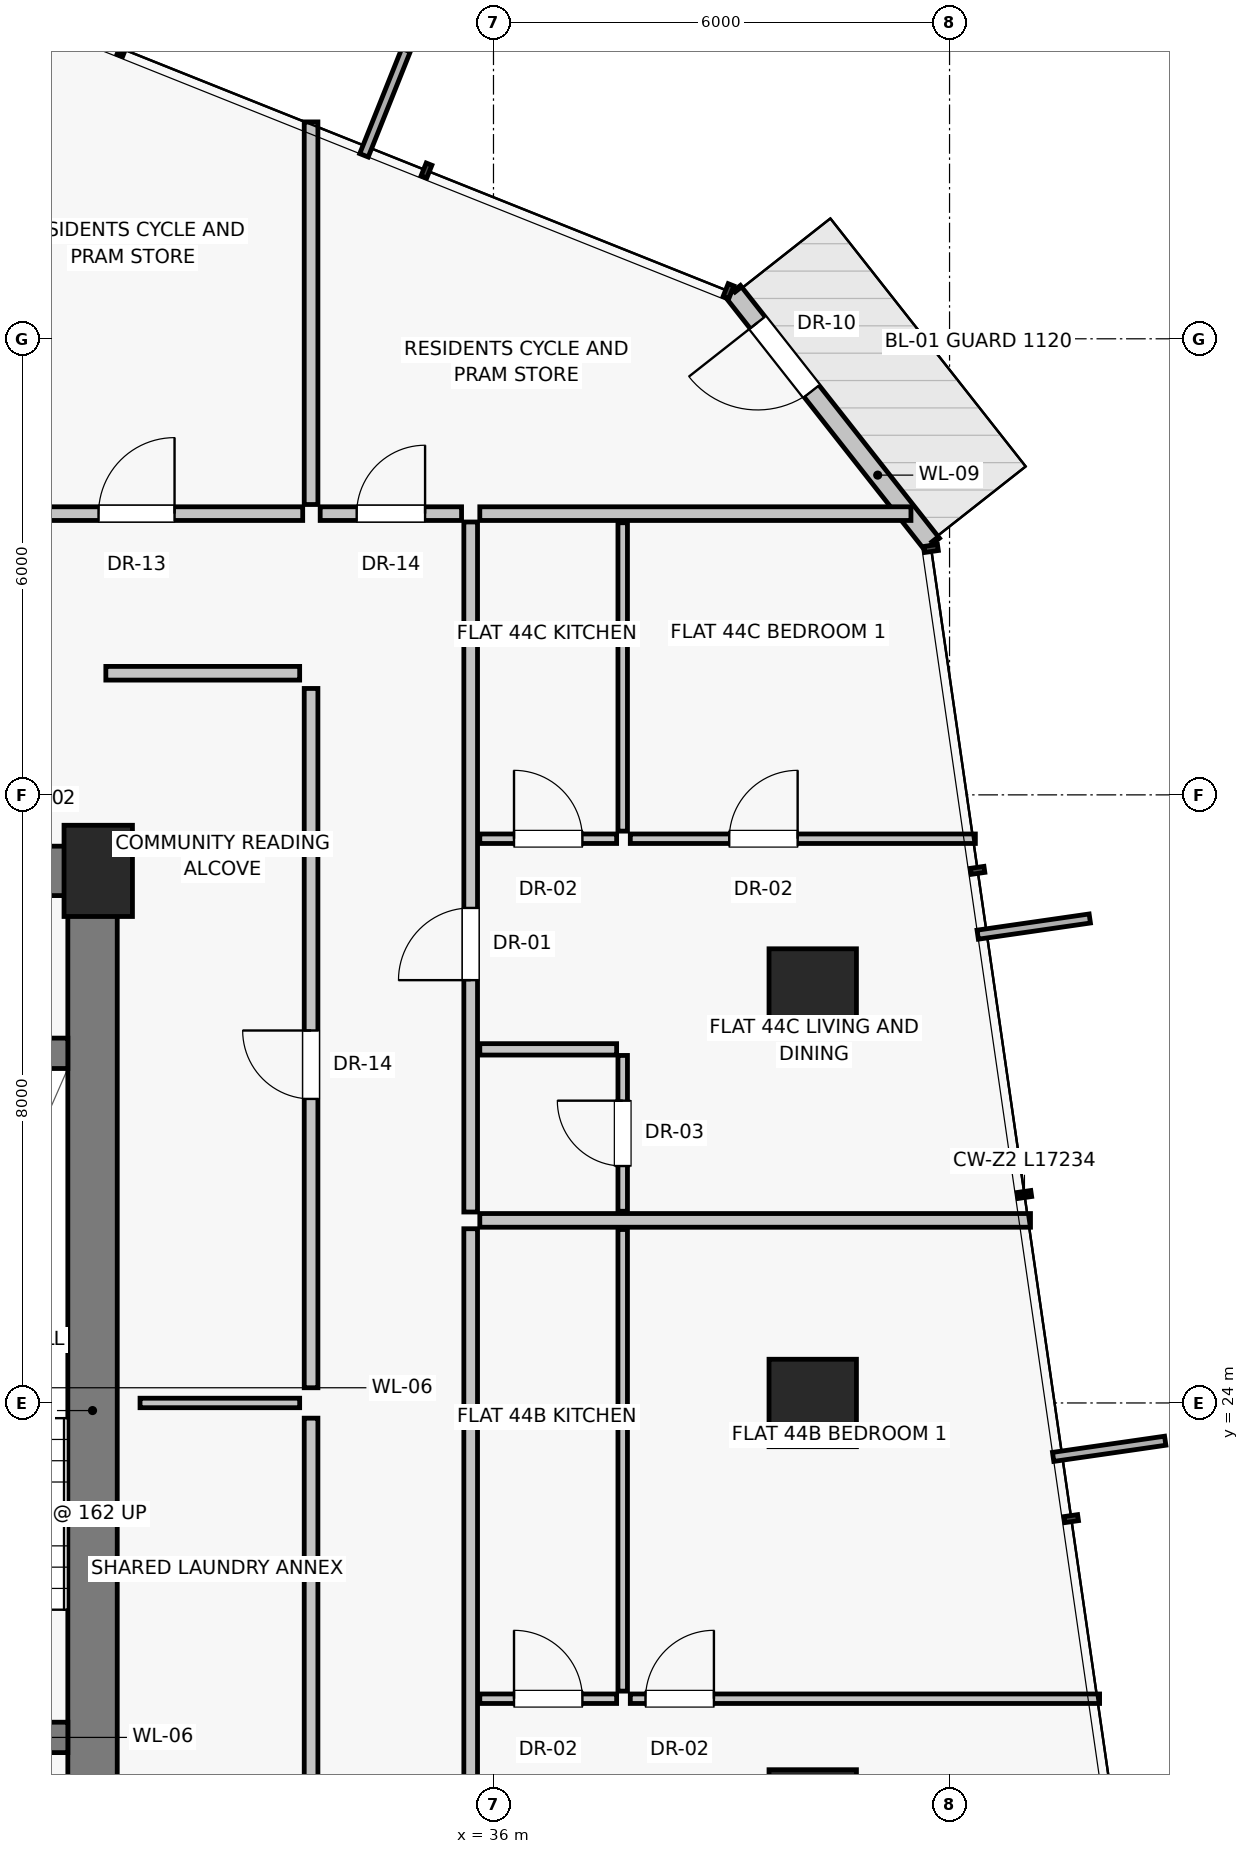
"""IFC4 building model, lengths in metres.
Left out: names, types, materials, properties, quantities, classifications, styles, units other than length and angle.
Written with IfcOpenShell. Run it as: python <this file> out.ifc"""

import sys

from ifc_helpers import new_model, si_unit, direction, frame, frame_2d, origin, origin_2d, place, context, subcontext, project, spatial, rectangle, extrude, source, transform, mapped, element, fill, save


model = new_model("IFC4")
c1 = context("Model", 3, precision=1e-05, world=origin(), true_north=direction((0.0, 1.0)))
c2 = subcontext(c1, "Body", "Model", "MODEL_VIEW")
j1 = project(units=[si_unit("LENGTHUNIT", "METRE"), si_unit("PLANEANGLEUNIT", "RADIAN")], contexts=[c1])
p1 = place(None, origin())
s1 = spatial("IfcSite", under=j1, at=p1, CompositionType="ELEMENT")
p2 = place(p1, origin())
s2 = spatial("IfcBuilding", under=s1, at=p2, CompositionType="ELEMENT")
p3 = place(p2, frame((0.0, 0.0, 155.5)))
s3 = spatial("IfcBuildingStorey", under=s2, at=p3, CompositionType="ELEMENT", Elevation=155.5)
p4 = place(p3, frame((30.8, 31.0, 0.0), z_axis=(0.0, 0.0, 1.0), x_axis=(1.0, 0.0, 0.0)))
e1 = element("IfcColumn", 1, at=p4, inside=s3, PredefinedType="PILASTER", context=c2, shape_type="SweptSolid", body=[
    extrude(rectangle(XDim=0.9, YDim=1.2, at=origin_2d()), origin(), (0.0, 0.0, 1.0), 3.25),
])
for number, where, z_axis, x_axis in (
    (2, (40.2, 18.6, 0.0), (0.0, 0.0, 1.0), (1.0, 0.0, 0.0)),
    (3, (40.2, 24.0, 0.0), (0.0, 0.0, 1.0), (1.0, 0.0, 0.0)),
    (4, (40.2, 29.4, 0.0), (0.0, 0.0, 1.0), (1.0, 0.0, 0.0)),
):
    element("IfcColumn", number, at=place(p3, frame(where, z_axis=z_axis, x_axis=x_axis)), inside=s3, PredefinedType="COLUMN", context=c2, shape_type="SweptSolid", body=[
        extrude(rectangle(XDim=1.15, YDim=1.15, at=origin_2d()), origin(), (0.0, 0.0, 1.0), 3.25),
    ])
p5 = place(p3, frame((41.77, 35.299, 0.0), z_axis=(0.0, 0.0, 1.0), x_axis=(-0.618677028306, 0.785645425523, 0.0)))
e5 = element("IfcWall", 5, at=p5, inside=s3, PredefinedType="SOLIDWALL", context=c2, shape_type="SweptSolid", body=[
    extrude(rectangle(XDim=4.233, YDim=0.25, at=frame_2d((2.117, 0.0))), origin(), (0.0, 0.0, 1.0), 2.97),
])
p6 = place(p5, frame((2.56, 0.0, 0.0)))
e6 = element("IfcOpeningElement", 6, at=p6, cuts=e5, PredefinedType="OPENING", context=c2, shape_type="SweptSolid", body=[
    extrude(rectangle(XDim=1.15, YDim=2.25, at=frame_2d((0.575, 1.125))), frame((0.0, 0.135, 0.0), z_axis=(0.0, -1.0, 0.0), x_axis=(1.0, 0.0, 0.0)), (0.0, 0.0, 1.0), 0.27),
])
p7 = place(p3, frame((30.725, 16.8, 0.0), z_axis=(0.0, 0.0, 1.0), x_axis=(0.0, 1.0, 0.0)))
e7 = element("IfcWall", 7, at=p7, inside=s3, PredefinedType="SHEAR", context=c2, shape_type="SweptSolid", body=[
    extrude(rectangle(XDim=14.2, YDim=0.65, at=frame_2d((7.1, 0.0))), origin(), (0.0, 0.0, 1.0), 2.97),
])
p8 = place(p3, frame((27.0, 31.0, 0.0), z_axis=(0.0, 0.0, 1.0), x_axis=(1.0, 0.0, 0.0)))
e8 = element("IfcWall", 8, at=p8, inside=s3, PredefinedType="SHEAR", context=c2, shape_type="SweptSolid", body=[
    extrude(rectangle(XDim=3.8, YDim=0.65, at=frame_2d((1.9, 0.0))), origin(), (0.0, 0.0, 1.0), 2.97),
])
p9 = place(p8, frame((1.15, 0.0, 0.0)))
e9 = element("IfcOpeningElement", 9, at=p9, cuts=e8, PredefinedType="OPENING", context=c2, shape_type="SweptSolid", body=[
    extrude(rectangle(XDim=1.0, YDim=2.01, at=frame_2d((0.5, 1.005))), frame((0.0, 0.335, 0.0), z_axis=(0.0, -1.0, 0.0), x_axis=(1.0, 0.0, 0.0)), (0.0, 0.0, 1.0), 0.67),
])
p10 = place(p3, frame((27.0, 19.6, 0.0), z_axis=(0.0, 0.0, 1.0), x_axis=(1.0, 0.0, 0.0)))
e10 = element("IfcWall", 10, at=p10, inside=s3, PredefinedType="SHEAR", context=c2, shape_type="SweptSolid", body=[
    extrude(rectangle(XDim=3.4, YDim=0.4, at=frame_2d((1.7, 0.0))), origin(), (0.0, 0.0, 1.0), 2.97),
])
p11 = place(p10, frame((1.05, 0.0, 0.0)))
e11 = element("IfcOpeningElement", 11, at=p11, cuts=e10, PredefinedType="OPENING", context=c2, shape_type="SweptSolid", body=[
    extrude(rectangle(XDim=1.1, YDim=2.03, at=frame_2d((0.55, 1.015))), frame((0.0, 0.21, 0.0), z_axis=(0.0, -1.0, 0.0), x_axis=(1.0, 0.0, 0.0)), (0.0, 0.0, 1.0), 0.42),
])
p12 = place(p3, frame((27.0, 28.6, 0.0), z_axis=(0.0, 0.0, 1.0), x_axis=(1.0, 0.0, 0.0)))
e12 = element("IfcWall", 12, at=p12, inside=s3, PredefinedType="SHEAR", context=c2, shape_type="SweptSolid", body=[
    extrude(rectangle(XDim=3.4, YDim=0.4, at=frame_2d((1.7, 0.0))), origin(), (0.0, 0.0, 1.0), 2.97),
])
p13 = place(p3, frame((33.6, 14.4, 0.0), z_axis=(0.0, 0.0, 1.0), x_axis=(0.0, 1.0, 0.0)))
e13 = element("IfcWall", 13, at=p13, inside=s3, PredefinedType="PARTITIONING", context=c2, shape_type="SweptSolid", body=[
    extrude(rectangle(XDim=9.4, YDim=0.18, at=frame_2d((4.7, 0.0))), origin(), (0.0, 0.0, 1.0), 2.97),
])
p14 = place(p13, frame((3.8, 0.0, 0.0)))
e14 = element("IfcOpeningElement", 14, at=p14, cuts=e13, PredefinedType="OPENING", context=c2, shape_type="SweptSolid", body=[
    extrude(rectangle(XDim=0.9, YDim=2.01, at=frame_2d((0.45, 1.005))), frame((0.0, 0.1, 0.0), z_axis=(0.0, -1.0, 0.0), x_axis=(1.0, 0.0, 0.0)), (0.0, 0.0, 1.0), 0.2),
])
p15 = place(p3, frame((33.6, 24.2, 0.0), z_axis=(0.0, 0.0, 1.0), x_axis=(0.0, 1.0, 0.0)))
e15 = element("IfcWall", 15, at=p15, inside=s3, PredefinedType="PARTITIONING", context=c2, shape_type="SweptSolid", body=[
    extrude(rectangle(XDim=9.2, YDim=0.18, at=frame_2d((4.6, 0.0))), origin(), (0.0, 0.0, 1.0), 2.97),
])
p16 = place(p15, frame((3.8, 0.0, 0.0)))
e16 = element("IfcOpeningElement", 16, at=p16, cuts=e15, PredefinedType="OPENING", context=c2, shape_type="SweptSolid", body=[
    extrude(rectangle(XDim=0.9, YDim=2.01, at=frame_2d((0.45, 1.005))), frame((0.0, 0.1, 0.0), z_axis=(0.0, -1.0, 0.0), x_axis=(1.0, 0.0, 0.0)), (0.0, 0.0, 1.0), 0.2),
])
p17 = place(p3, frame((31.35, 24.0, 0.0), z_axis=(0.0, 0.0, 1.0), x_axis=(1.0, 0.0, 0.0)))
e17 = element("IfcWall", 17, at=p17, inside=s3, PredefinedType="PARTITIONING", context=c2, shape_type="SweptSolid", body=[
    extrude(rectangle(XDim=2.1, YDim=0.125, at=frame_2d((1.05, 0.0))), origin(), (0.0, 0.0, 1.0), 2.97),
])
p18 = place(p3, frame((30.9, 33.6, 0.0), z_axis=(0.0, 0.0, 1.0), x_axis=(1.0, 0.0, 0.0)))
e18 = element("IfcWall", 18, at=p18, inside=s3, PredefinedType="PARTITIONING", context=c2, shape_type="SweptSolid", body=[
    extrude(rectangle(XDim=2.55, YDim=0.18, at=frame_2d((1.275, 0.0))), origin(), (0.0, 0.0, 1.0), 2.97),
])
p19 = place(p3, frame((33.6, 35.82, 0.0), z_axis=(0.0, 0.0, 1.0), x_axis=(0.0, 1.0, 0.0)))
e19 = element("IfcWall", 19, at=p19, inside=s3, PredefinedType="PARTITIONING", context=c2, shape_type="SweptSolid", body=[
    extrude(rectangle(XDim=5.033, YDim=0.18, at=frame_2d((2.517, 0.0))), origin(), (0.0, 0.0, 1.0), 2.97),
])
p20 = place(p3, frame((29.118, 35.7, 0.0), z_axis=(0.0, 0.0, 1.0), x_axis=(1.0, 0.0, 0.0)))
e20 = element("IfcWall", 20, at=p20, inside=s3, PredefinedType="PARTITIONING", context=c2, shape_type="SweptSolid", body=[
    extrude(rectangle(XDim=4.372, YDim=0.18, at=frame_2d((2.186, 0.0))), origin(), (0.0, 0.0, 1.0), 2.55),
])
p21 = place(p20, frame((1.686, 0.0, 0.0)))
e21 = element("IfcOpeningElement", 21, at=p21, cuts=e20, PredefinedType="OPENING", context=c2, shape_type="SweptSolid", body=[
    extrude(rectangle(XDim=1.0, YDim=2.01, at=frame_2d((0.5, 1.005))), frame((0.0, 0.1, 0.0), z_axis=(0.0, -1.0, 0.0), x_axis=(1.0, 0.0, 0.0)), (0.0, 0.0, 1.0), 0.2),
])
p22 = place(p3, frame((35.82, 35.7, 0.0), z_axis=(0.0, 0.0, 1.0), x_axis=(1.0, 0.0, 0.0)))
e22 = element("IfcWall", 22, at=p22, inside=s3, PredefinedType="PARTITIONING", context=c2, shape_type="SweptSolid", body=[
    extrude(rectangle(XDim=5.672, YDim=0.18, at=frame_2d((2.836, 0.0))), origin(), (0.0, 0.0, 1.0), 2.97),
])
p23 = place(p3, frame((35.7, 12.21, 0.0), z_axis=(0.0, 0.0, 1.0), x_axis=(0.0, 1.0, 0.0)))
e23 = element("IfcWall", 23, at=p23, inside=s3, PredefinedType="PARTITIONING", context=c2, shape_type="SweptSolid", body=[
    extrude(rectangle(XDim=14.082, YDim=0.18, at=frame_2d((7.041, 0.0))), origin(), (0.0, 0.0, 1.0), 2.55),
])
p24 = place(p23, frame((4.544, 0.0, 0.0)))
e24 = element("IfcOpeningElement", 24, at=p24, cuts=e23, PredefinedType="OPENING", context=c2, shape_type="SweptSolid", body=[
    extrude(rectangle(XDim=0.95, YDim=2.02, at=frame_2d((0.475, 1.01))), frame((0.0, 0.1, 0.0), z_axis=(0.0, -1.0, 0.0), x_axis=(1.0, 0.0, 0.0)), (0.0, 0.0, 1.0), 0.2),
])
p25 = place(p3, frame((35.82, 20.109, 0.0), z_axis=(0.0, 0.0, 1.0), x_axis=(1.0, 0.0, 0.0)))
e25 = element("IfcWall", 25, at=p25, inside=s3, PredefinedType="PARTITIONING", context=c2, shape_type="SweptSolid", body=[
    extrude(rectangle(XDim=1.8, YDim=0.125, at=frame_2d((0.9, 0.0))), origin(), (0.0, 0.0, 1.0), 2.97),
])
p26 = place(p25, frame((0.45, 0.0, 0.0)))
e26 = element("IfcOpeningElement", 26, at=p26, cuts=e25, PredefinedType="OPENING", context=c2, shape_type="SweptSolid", body=[
    extrude(rectangle(XDim=0.9, YDim=2.01, at=frame_2d((0.45, 1.005))), frame((0.0, 0.073, 0.0), z_axis=(0.0, -1.0, 0.0), x_axis=(1.0, 0.0, 0.0)), (0.0, 0.0, 1.0), 0.145),
])
p27 = place(p3, frame((37.7, 20.209, 0.0), z_axis=(0.0, 0.0, 1.0), x_axis=(0.0, 1.0, 0.0)))
e27 = element("IfcWall", 27, at=p27, inside=s3, PredefinedType="PARTITIONING", context=c2, shape_type="SweptSolid", body=[
    extrude(rectangle(XDim=6.073, YDim=0.125, at=frame_2d((3.037, 0.0))), origin(), (0.0, 0.0, 1.0), 2.97),
])
p28 = place(p3, frame((37.8, 20.109, 0.0), z_axis=(0.0, 0.0, 1.0), x_axis=(1.0, 0.0, 0.0)))
e28 = element("IfcWall", 28, at=p28, inside=s3, PredefinedType="PARTITIONING", context=c2, shape_type="SweptSolid", body=[
    extrude(rectangle(XDim=6.174, YDim=0.125, at=frame_2d((3.087, 0.0))), origin(), (0.0, 0.0, 1.0), 2.97),
])
p29 = place(p28, frame((0.2, 0.0, 0.0)))
e29 = element("IfcOpeningElement", 29, at=p29, cuts=e28, PredefinedType="OPENING", context=c2, shape_type="SweptSolid", body=[
    extrude(rectangle(XDim=0.9, YDim=2.01, at=frame_2d((0.45, 1.005))), frame((0.0, 0.073, 0.0), z_axis=(0.0, -1.0, 0.0), x_axis=(1.0, 0.0, 0.0)), (0.0, 0.0, 1.0), 0.145),
])
p30 = place(p3, frame((35.82, 26.402, 0.0), z_axis=(0.0, 0.0, 1.0), x_axis=(1.0, 0.0, 0.0)))
e30 = element("IfcWall", 30, at=p30, inside=s3, PredefinedType="PARTITIONING", context=c2, shape_type="SweptSolid", body=[
    extrude(rectangle(XDim=7.245, YDim=0.18, at=frame_2d((3.623, 0.0))), origin(), (0.0, 0.0, 1.0), 2.97),
])
p31 = place(p3, frame((35.7, 26.512, 0.0), z_axis=(0.0, 0.0, 1.0), x_axis=(0.0, 1.0, 0.0)))
e31 = element("IfcWall", 31, at=p31, inside=s3, PredefinedType="PARTITIONING", context=c2, shape_type="SweptSolid", body=[
    extrude(rectangle(XDim=9.078, YDim=0.18, at=frame_2d((4.539, 0.0))), origin(), (0.0, 0.0, 1.0), 2.55),
])
p32 = place(p31, frame((3.051, 0.0, 0.0)))
e32 = element("IfcOpeningElement", 32, at=p32, cuts=e31, PredefinedType="OPENING", context=c2, shape_type="SweptSolid", body=[
    extrude(rectangle(XDim=0.95, YDim=2.02, at=frame_2d((0.475, 1.01))), frame((0.0, 0.1, 0.0), z_axis=(0.0, -1.0, 0.0), x_axis=(1.0, 0.0, 0.0)), (0.0, 0.0, 1.0), 0.2),
])
p33 = place(p3, frame((35.82, 28.652, 0.0), z_axis=(0.0, 0.0, 1.0), x_axis=(1.0, 0.0, 0.0)))
e33 = element("IfcWall", 33, at=p33, inside=s3, PredefinedType="PARTITIONING", context=c2, shape_type="SweptSolid", body=[
    extrude(rectangle(XDim=1.8, YDim=0.15, at=frame_2d((0.9, 0.0))), origin(), (0.0, 0.0, 1.0), 2.97),
])
p34 = place(p3, frame((37.7, 26.522, 0.0), z_axis=(0.0, 0.0, 1.0), x_axis=(0.0, 1.0, 0.0)))
e34 = element("IfcWall", 34, at=p34, inside=s3, PredefinedType="PARTITIONING", context=c2, shape_type="SweptSolid", body=[
    extrude(rectangle(XDim=2.05, YDim=0.125, at=frame_2d((1.025, 0.0))), origin(), (0.0, 0.0, 1.0), 2.97),
])
p35 = place(p34, frame((0.595, 0.0, 0.0)))
e35 = element("IfcOpeningElement", 35, at=p35, cuts=e34, PredefinedType="OPENING", context=c2, shape_type="SweptSolid", body=[
    extrude(rectangle(XDim=0.86, YDim=2.01, at=frame_2d((0.43, 1.005))), frame((0.0, 0.073, 0.0), z_axis=(0.0, -1.0, 0.0), x_axis=(1.0, 0.0, 0.0)), (0.0, 0.0, 1.0), 0.145),
])
p36 = place(p3, frame((35.82, 31.423, 0.0), z_axis=(0.0, 0.0, 1.0), x_axis=(1.0, 0.0, 0.0)))
e36 = element("IfcWall", 36, at=p36, inside=s3, PredefinedType="PARTITIONING", context=c2, shape_type="SweptSolid", body=[
    extrude(rectangle(XDim=1.8, YDim=0.125, at=frame_2d((0.9, 0.0))), origin(), (0.0, 0.0, 1.0), 2.97),
])
p37 = place(p36, frame((0.45, 0.0, 0.0)))
e37 = element("IfcOpeningElement", 37, at=p37, cuts=e36, PredefinedType="OPENING", context=c2, shape_type="SweptSolid", body=[
    extrude(rectangle(XDim=0.9, YDim=2.01, at=frame_2d((0.45, 1.005))), frame((0.0, 0.073, 0.0), z_axis=(0.0, -1.0, 0.0), x_axis=(1.0, 0.0, 0.0)), (0.0, 0.0, 1.0), 0.145),
])
p38 = place(p3, frame((37.7, 31.523, 0.0), z_axis=(0.0, 0.0, 1.0), x_axis=(0.0, 1.0, 0.0)))
e38 = element("IfcWall", 38, at=p38, inside=s3, PredefinedType="PARTITIONING", context=c2, shape_type="SweptSolid", body=[
    extrude(rectangle(XDim=4.057, YDim=0.125, at=frame_2d((2.029, 0.0))), origin(), (0.0, 0.0, 1.0), 2.97),
])
p39 = place(p3, frame((37.8, 31.423, 0.0), z_axis=(0.0, 0.0, 1.0), x_axis=(1.0, 0.0, 0.0)))
e39 = element("IfcWall", 39, at=p39, inside=s3, PredefinedType="PARTITIONING", context=c2, shape_type="SweptSolid", body=[
    extrude(rectangle(XDim=4.54, YDim=0.125, at=frame_2d((2.27, 0.0))), origin(), (0.0, 0.0, 1.0), 2.97),
])
p40 = place(p39, frame((1.302, 0.0, 0.0)))
e40 = element("IfcOpeningElement", 40, at=p40, cuts=e39, PredefinedType="OPENING", context=c2, shape_type="SweptSolid", body=[
    extrude(rectangle(XDim=0.9, YDim=2.01, at=frame_2d((0.45, 1.005))), frame((0.0, 0.073, 0.0), z_axis=(0.0, -1.0, 0.0), x_axis=(1.0, 0.0, 0.0)), (0.0, 0.0, 1.0), 0.145),
])
p41 = place(p3, frame((33.72, 35.7, 0.0), z_axis=(0.0, 0.0, 1.0), x_axis=(1.0, 0.0, 0.0)))
e41 = element("IfcWall", 41, at=p41, inside=s3, PredefinedType="PARTITIONING", context=c2, shape_type="SweptSolid", body=[
    extrude(rectangle(XDim=1.86, YDim=0.18, at=frame_2d((0.93, 0.0))), origin(), (0.0, 0.0, 1.0), 2.97),
])
p42 = place(p41, frame((0.48, 0.0, 0.0)))
e42 = element("IfcOpeningElement", 42, at=p42, cuts=e41, PredefinedType="OPENING", context=c2, shape_type="SweptSolid", body=[
    extrude(rectangle(XDim=0.9, YDim=2.01, at=frame_2d((0.45, 1.005))), frame((0.0, 0.1, 0.0), z_axis=(0.0, -1.0, 0.0), x_axis=(1.0, 0.0, 0.0)), (0.0, 0.0, 1.0), 0.2),
])
m1 = source(origin(), c2, "Body", "SweptSolid", [
    extrude(rectangle(XDim=1.15, YDim=2.25, at=frame_2d((0.575, 1.125))), frame((0.0, 0.025, 0.0), z_axis=(0.0, -1.0, 0.0), x_axis=(1.0, 0.0, 0.0)), (0.0, 0.0, 1.0), 0.05),
])
p43 = place(p6, frame((1.15, 0.0, 0.0), z_axis=(0.0, 0.0, 1.0), x_axis=(-1.0, 0.0, 0.0)))
e43 = element("IfcDoor", 43, at=p43, inside=s3, OperationType="SINGLE_SWING_RIGHT", PredefinedType="DOOR", context=c2, shape_type="MappedRepresentation", body=[
    mapped(m1, transform((0.0, 0.0, 0.0), scale=1.0)),
])
fill(e6, e43)
m2 = source(origin(), c2, "Body", "SweptSolid", [
    extrude(rectangle(XDim=0.9, YDim=2.01, at=frame_2d((0.45, 1.005))), frame((0.0, 0.025, 0.0), z_axis=(0.0, -1.0, 0.0), x_axis=(1.0, 0.0, 0.0)), (0.0, 0.0, 1.0), 0.05),
])
p44 = place(p16, origin())
e44 = element("IfcDoor", 44, at=p44, inside=s3, OperationType="SINGLE_SWING_RIGHT", PredefinedType="DOOR", context=c2, shape_type="MappedRepresentation", body=[
    mapped(m2, transform((0.0, 0.0, 0.0), scale=1.0)),
])
fill(e16, e44)
m3 = source(origin(), c2, "Body", "SweptSolid", [
    extrude(rectangle(XDim=1.0, YDim=2.01, at=frame_2d((0.5, 1.005))), frame((0.0, 0.025, 0.0), z_axis=(0.0, -1.0, 0.0), x_axis=(1.0, 0.0, 0.0)), (0.0, 0.0, 1.0), 0.05),
])
p45 = place(p21, origin())
e45 = element("IfcDoor", 45, at=p45, inside=s3, OperationType="SINGLE_SWING_RIGHT", PredefinedType="DOOR", context=c2, shape_type="MappedRepresentation", body=[
    mapped(m3, transform((0.0, 0.0, 0.0), scale=1.0)),
])
fill(e21, e45)
p46 = place(p26, origin())
e46 = element("IfcDoor", 46, at=p46, inside=s3, OperationType="SINGLE_SWING_LEFT", PredefinedType="DOOR", context=c2, shape_type="MappedRepresentation", body=[
    mapped(m2, transform((0.0, 0.0, 0.0), scale=1.0)),
])
fill(e26, e46)
p47 = place(p29, origin())
e47 = element("IfcDoor", 47, at=p47, inside=s3, OperationType="SINGLE_SWING_RIGHT", PredefinedType="DOOR", context=c2, shape_type="MappedRepresentation", body=[
    mapped(m2, transform((0.0, 0.0, 0.0), scale=1.0)),
])
fill(e29, e47)
m4 = source(origin(), c2, "Body", "SweptSolid", [
    extrude(rectangle(XDim=0.95, YDim=2.02, at=frame_2d((0.475, 1.01))), frame((0.0, 0.025, 0.0), z_axis=(0.0, -1.0, 0.0), x_axis=(1.0, 0.0, 0.0)), (0.0, 0.0, 1.0), 0.05),
])
p48 = place(p32, origin())
e48 = element("IfcDoor", 48, at=p48, inside=s3, OperationType="SINGLE_SWING_LEFT", PredefinedType="DOOR", context=c2, shape_type="MappedRepresentation", body=[
    mapped(m4, transform((0.0, 0.0, 0.0), scale=1.0)),
])
fill(e32, e48)
m5 = source(origin(), c2, "Body", "SweptSolid", [
    extrude(rectangle(XDim=0.86, YDim=2.01, at=frame_2d((0.43, 1.005))), frame((0.0, 0.025, 0.0), z_axis=(0.0, -1.0, 0.0), x_axis=(1.0, 0.0, 0.0)), (0.0, 0.0, 1.0), 0.05),
])
p49 = place(p35, origin())
e49 = element("IfcDoor", 49, at=p49, inside=s3, OperationType="SINGLE_SWING_RIGHT", PredefinedType="DOOR", context=c2, shape_type="MappedRepresentation", body=[
    mapped(m5, transform((0.0, 0.0, 0.0), scale=1.0)),
])
fill(e35, e49)
p50 = place(p37, origin())
e50 = element("IfcDoor", 50, at=p50, inside=s3, OperationType="SINGLE_SWING_LEFT", PredefinedType="DOOR", context=c2, shape_type="MappedRepresentation", body=[
    mapped(m2, transform((0.0, 0.0, 0.0), scale=1.0)),
])
fill(e37, e50)
p51 = place(p40, origin())
e51 = element("IfcDoor", 51, at=p51, inside=s3, OperationType="SINGLE_SWING_RIGHT", PredefinedType="DOOR", context=c2, shape_type="MappedRepresentation", body=[
    mapped(m2, transform((0.0, 0.0, 0.0), scale=1.0)),
])
fill(e40, e51)
p52 = place(p42, origin())
e52 = element("IfcDoor", 52, at=p52, inside=s3, OperationType="SINGLE_SWING_RIGHT", PredefinedType="DOOR", context=c2, shape_type="MappedRepresentation", body=[
    mapped(m2, transform((0.0, 0.0, 0.0), scale=1.0)),
])
fill(e42, e52)
save(model, sys.argv[1])
